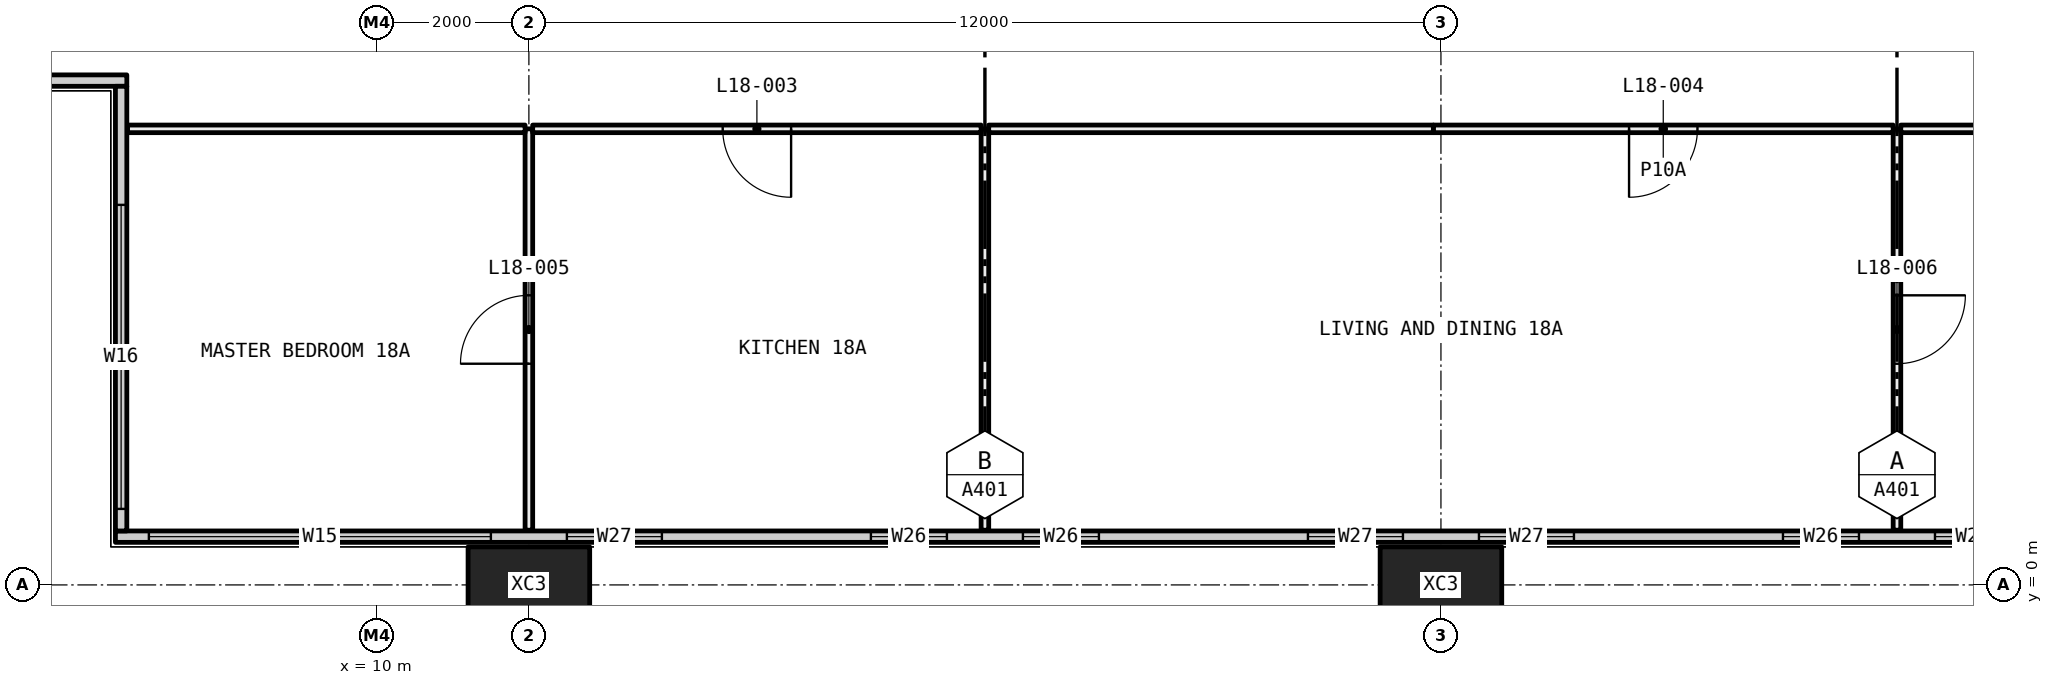
"""IFC4 building model, lengths in metres.
Left out: names, types, materials, properties, quantities, classifications, styles, units other than length and angle.
Written with IfcOpenShell. Run it as: python <this file> out.ifc"""

import sys

from ifc_helpers import new_model, si_unit, direction, frame, frame_2d, origin, origin_2d, place, context, subcontext, project, spatial, rectangle, hollow_rectangle, extrude, element, fill, save


model = new_model("IFC4")
c1 = context("Model", 3, precision=1e-05, world=origin(), true_north=direction((0.0, 1.0)))
c2 = subcontext(c1, "Body", "Model", "MODEL_VIEW")
j1 = project(units=[si_unit("LENGTHUNIT", "METRE"), si_unit("PLANEANGLEUNIT", "RADIAN")], contexts=[c1])
p1 = place(None, origin())
s1 = spatial("IfcSite", under=j1, at=p1, CompositionType="ELEMENT")
p2 = place(p1, origin())
s2 = spatial("IfcBuilding", under=s1, at=p2, CompositionType="ELEMENT")
p3 = place(p2, frame((0.0, 0.0, 74.85)))
s3 = spatial("IfcBuildingStorey", under=s2, at=p3, CompositionType="ELEMENT", Elevation=74.85)
for number, where, z_axis, x_axis in (
    (1, (12.0, 0.0, -0.4), (0.0, 0.0, 1.0), (1.0, 0.0, 0.0)),
    (2, (24.0, 0.0, -0.4), (0.0, 0.0, 1.0), (1.0, 0.0, 0.0)),
):
    element("IfcColumn", number, at=place(p3, frame(where, z_axis=z_axis, x_axis=x_axis)), inside=s3, PredefinedType="COLUMN", context=c2, shape_type="SweptSolid", body=[
        extrude(hollow_rectangle(XDim=1.6, YDim=1.0, WallThickness=0.065, at=origin_2d()), origin(), (0.0, 0.0, 1.0), 3.45),
    ])
p4 = place(p3, frame((6.56, 0.635, 0.0), z_axis=(0.0, 0.0, 1.0), x_axis=(1.0, 0.0, 0.0)))
e3 = element("IfcWall", 3, at=p4, inside=s3, PredefinedType="ELEMENTEDWALL", context=c2, shape_type="SweptSolid", body=[
    extrude(rectangle(XDim=58.88, YDim=0.15, at=frame_2d((29.44, 0.0))), origin(), (0.0, 0.0, 1.0), 3.05),
])
p5 = place(p4, frame((0.44, 0.0, 0.45)))
e4 = element("IfcOpeningElement", 4, at=p5, cuts=e3, PredefinedType="OPENING", context=c2, shape_type="SweptSolid", body=[
    extrude(rectangle(XDim=4.5, YDim=2.55, at=frame_2d((2.25, 1.275))), frame((0.0, 0.085, 0.0), z_axis=(0.0, -1.0, 0.0), x_axis=(1.0, 0.0, 0.0)), (0.0, 0.0, 1.0), 0.17),
])
p6 = place(p4, frame((5.94, 0.0, 0.45)))
e5 = element("IfcOpeningElement", 5, at=p6, cuts=e3, PredefinedType="OPENING", context=c2, shape_type="SweptSolid", body=[
    extrude(rectangle(XDim=1.25, YDim=2.55, at=frame_2d((0.625, 1.275))), frame((0.0, 0.085, 0.0), z_axis=(0.0, -1.0, 0.0), x_axis=(1.0, 0.0, 0.0)), (0.0, 0.0, 1.0), 0.17),
])
p7 = place(p4, frame((9.94, 0.0, 0.45)))
e6 = element("IfcOpeningElement", 6, at=p7, cuts=e3, PredefinedType="OPENING", context=c2, shape_type="SweptSolid", body=[
    extrude(rectangle(XDim=1.0, YDim=2.55, at=frame_2d((0.5, 1.275))), frame((0.0, 0.085, 0.0), z_axis=(0.0, -1.0, 0.0), x_axis=(1.0, 0.0, 0.0)), (0.0, 0.0, 1.0), 0.17),
])
p8 = place(p4, frame((11.94, 0.0, 0.45)))
e7 = element("IfcOpeningElement", 7, at=p8, cuts=e3, PredefinedType="OPENING", context=c2, shape_type="SweptSolid", body=[
    extrude(rectangle(XDim=1.0, YDim=2.55, at=frame_2d((0.5, 1.275))), frame((0.0, 0.085, 0.0), z_axis=(0.0, -1.0, 0.0), x_axis=(1.0, 0.0, 0.0)), (0.0, 0.0, 1.0), 0.17),
])
p9 = place(p4, frame((15.69, 0.0, 0.45)))
e8 = element("IfcOpeningElement", 8, at=p9, cuts=e3, PredefinedType="OPENING", context=c2, shape_type="SweptSolid", body=[
    extrude(rectangle(XDim=1.25, YDim=2.55, at=frame_2d((0.625, 1.275))), frame((0.0, 0.085, 0.0), z_axis=(0.0, -1.0, 0.0), x_axis=(1.0, 0.0, 0.0)), (0.0, 0.0, 1.0), 0.17),
])
p10 = place(p4, frame((17.94, 0.0, 0.45)))
e9 = element("IfcOpeningElement", 9, at=p10, cuts=e3, PredefinedType="OPENING", context=c2, shape_type="SweptSolid", body=[
    extrude(rectangle(XDim=1.25, YDim=2.55, at=frame_2d((0.625, 1.275))), frame((0.0, 0.085, 0.0), z_axis=(0.0, -1.0, 0.0), x_axis=(1.0, 0.0, 0.0)), (0.0, 0.0, 1.0), 0.17),
])
p11 = place(p4, frame((21.94, 0.0, 0.45)))
e10 = element("IfcOpeningElement", 10, at=p11, cuts=e3, PredefinedType="OPENING", context=c2, shape_type="SweptSolid", body=[
    extrude(rectangle(XDim=1.0, YDim=2.55, at=frame_2d((0.5, 1.275))), frame((0.0, 0.085, 0.0), z_axis=(0.0, -1.0, 0.0), x_axis=(1.0, 0.0, 0.0)), (0.0, 0.0, 1.0), 0.17),
])
p12 = place(p4, frame((23.94, 0.0, 0.45)))
e11 = element("IfcOpeningElement", 11, at=p12, cuts=e3, PredefinedType="OPENING", context=c2, shape_type="SweptSolid", body=[
    extrude(rectangle(XDim=1.0, YDim=2.55, at=frame_2d((0.5, 1.275))), frame((0.0, 0.085, 0.0), z_axis=(0.0, -1.0, 0.0), x_axis=(1.0, 0.0, 0.0)), (0.0, 0.0, 1.0), 0.17),
])
p13 = place(p4, frame((27.69, 0.0, 0.45)))
e12 = element("IfcOpeningElement", 12, at=p13, cuts=e3, PredefinedType="OPENING", context=c2, shape_type="SweptSolid", body=[
    extrude(rectangle(XDim=1.25, YDim=2.55, at=frame_2d((0.625, 1.275))), frame((0.0, 0.085, 0.0), z_axis=(0.0, -1.0, 0.0), x_axis=(1.0, 0.0, 0.0)), (0.0, 0.0, 1.0), 0.17),
])
p14 = place(p4, frame((29.94, 0.0, 0.45)))
e13 = element("IfcOpeningElement", 13, at=p14, cuts=e3, PredefinedType="OPENING", context=c2, shape_type="SweptSolid", body=[
    extrude(rectangle(XDim=1.25, YDim=2.55, at=frame_2d((0.625, 1.275))), frame((0.0, 0.085, 0.0), z_axis=(0.0, -1.0, 0.0), x_axis=(1.0, 0.0, 0.0)), (0.0, 0.0, 1.0), 0.17),
])
p15 = place(p4, frame((33.94, 0.0, 0.45)))
e14 = element("IfcOpeningElement", 14, at=p15, cuts=e3, PredefinedType="OPENING", context=c2, shape_type="SweptSolid", body=[
    extrude(rectangle(XDim=1.0, YDim=2.55, at=frame_2d((0.5, 1.275))), frame((0.0, 0.085, 0.0), z_axis=(0.0, -1.0, 0.0), x_axis=(1.0, 0.0, 0.0)), (0.0, 0.0, 1.0), 0.17),
])
p16 = place(p4, frame((35.94, 0.0, 0.45)))
e15 = element("IfcOpeningElement", 15, at=p16, cuts=e3, PredefinedType="OPENING", context=c2, shape_type="SweptSolid", body=[
    extrude(rectangle(XDim=1.0, YDim=2.55, at=frame_2d((0.5, 1.275))), frame((0.0, 0.085, 0.0), z_axis=(0.0, -1.0, 0.0), x_axis=(1.0, 0.0, 0.0)), (0.0, 0.0, 1.0), 0.17),
])
p17 = place(p4, frame((39.69, 0.0, 0.45)))
e16 = element("IfcOpeningElement", 16, at=p17, cuts=e3, PredefinedType="OPENING", context=c2, shape_type="SweptSolid", body=[
    extrude(rectangle(XDim=1.25, YDim=2.55, at=frame_2d((0.625, 1.275))), frame((0.0, 0.085, 0.0), z_axis=(0.0, -1.0, 0.0), x_axis=(1.0, 0.0, 0.0)), (0.0, 0.0, 1.0), 0.17),
])
p18 = place(p4, frame((41.94, 0.0, 0.45)))
e17 = element("IfcOpeningElement", 17, at=p18, cuts=e3, PredefinedType="OPENING", context=c2, shape_type="SweptSolid", body=[
    extrude(rectangle(XDim=1.25, YDim=2.55, at=frame_2d((0.625, 1.275))), frame((0.0, 0.085, 0.0), z_axis=(0.0, -1.0, 0.0), x_axis=(1.0, 0.0, 0.0)), (0.0, 0.0, 1.0), 0.17),
])
p19 = place(p4, frame((45.94, 0.0, 0.45)))
e18 = element("IfcOpeningElement", 18, at=p19, cuts=e3, PredefinedType="OPENING", context=c2, shape_type="SweptSolid", body=[
    extrude(rectangle(XDim=1.0, YDim=2.55, at=frame_2d((0.5, 1.275))), frame((0.0, 0.085, 0.0), z_axis=(0.0, -1.0, 0.0), x_axis=(1.0, 0.0, 0.0)), (0.0, 0.0, 1.0), 0.17),
])
p20 = place(p4, frame((47.94, 0.0, 0.45)))
e19 = element("IfcOpeningElement", 19, at=p20, cuts=e3, PredefinedType="OPENING", context=c2, shape_type="SweptSolid", body=[
    extrude(rectangle(XDim=1.0, YDim=2.55, at=frame_2d((0.5, 1.275))), frame((0.0, 0.085, 0.0), z_axis=(0.0, -1.0, 0.0), x_axis=(1.0, 0.0, 0.0)), (0.0, 0.0, 1.0), 0.17),
])
p21 = place(p4, frame((51.69, 0.0, 0.45)))
e20 = element("IfcOpeningElement", 20, at=p21, cuts=e3, PredefinedType="OPENING", context=c2, shape_type="SweptSolid", body=[
    extrude(rectangle(XDim=1.25, YDim=2.55, at=frame_2d((0.625, 1.275))), frame((0.0, 0.085, 0.0), z_axis=(0.0, -1.0, 0.0), x_axis=(1.0, 0.0, 0.0)), (0.0, 0.0, 1.0), 0.17),
])
p22 = place(p4, frame((53.94, 0.0, 0.45)))
e21 = element("IfcOpeningElement", 21, at=p22, cuts=e3, PredefinedType="OPENING", context=c2, shape_type="SweptSolid", body=[
    extrude(rectangle(XDim=4.5, YDim=2.55, at=frame_2d((2.25, 1.275))), frame((0.0, 0.085, 0.0), z_axis=(0.0, -1.0, 0.0), x_axis=(1.0, 0.0, 0.0)), (0.0, 0.0, 1.0), 0.17),
])
p23 = place(p3, frame((0.56, 6.635, 0.0), z_axis=(0.0, 0.0, 1.0), x_axis=(1.0, 0.0, 0.0)))
e22 = element("IfcWall", 22, at=p23, inside=s3, PredefinedType="ELEMENTEDWALL", context=c2, shape_type="SweptSolid", body=[
    extrude(rectangle(XDim=6.15, YDim=0.15, at=frame_2d((3.075, 0.0))), origin(), (0.0, 0.0, 1.0), 3.05),
])
p24 = place(p23, frame((0.44, 0.0, 0.45)))
e23 = element("IfcOpeningElement", 23, at=p24, cuts=e22, PredefinedType="OPENING", context=c2, shape_type="SweptSolid", body=[
    extrude(rectangle(XDim=4.0, YDim=2.55, at=frame_2d((2.0, 1.275))), frame((0.0, 0.085, 0.0), z_axis=(0.0, -1.0, 0.0), x_axis=(1.0, 0.0, 0.0)), (0.0, 0.0, 1.0), 0.17),
])
p25 = place(p3, frame((6.635, 0.71, 0.0), z_axis=(0.0, 0.0, 1.0), x_axis=(0.0, 1.0, 0.0)))
e24 = element("IfcWall", 24, at=p25, inside=s3, PredefinedType="ELEMENTEDWALL", context=c2, shape_type="SweptSolid", body=[
    extrude(rectangle(XDim=5.85, YDim=0.15, at=frame_2d((2.925, 0.0))), origin(), (0.0, 0.0, 1.0), 3.05),
])
p26 = place(p25, frame((0.29, 0.0, 0.45)))
e25 = element("IfcOpeningElement", 25, at=p26, cuts=e24, PredefinedType="OPENING", context=c2, shape_type="SweptSolid", body=[
    extrude(rectangle(XDim=4.0, YDim=2.55, at=frame_2d((2.0, 1.275))), frame((0.0, 0.085, 0.0), z_axis=(0.0, -1.0, 0.0), x_axis=(1.0, 0.0, 0.0)), (0.0, 0.0, 1.0), 0.17),
])
p27 = place(p3, frame((12.0, 0.72, 0.0), z_axis=(0.0, 0.0, 1.0), x_axis=(0.0, 1.0, 0.0)))
e26 = element("IfcWall", 26, at=p27, inside=s3, PredefinedType="PARTITIONING", context=c2, shape_type="SweptSolid", body=[
    extrude(rectangle(XDim=5.28, YDim=0.1, at=frame_2d((2.64, 0.0))), origin(), (0.0, 0.0, 1.0), 2.45),
])
p28 = place(p27, frame((2.19, 0.0, 0.0)))
e27 = element("IfcOpeningElement", 27, at=p28, cuts=e26, PredefinedType="OPENING", context=c2, shape_type="SweptSolid", body=[
    extrude(rectangle(XDim=0.9, YDim=2.1, at=frame_2d((0.45, 1.05))), frame((0.0, 0.06, 0.0), z_axis=(0.0, -1.0, 0.0), x_axis=(1.0, 0.0, 0.0)), (0.0, 0.0, 1.0), 0.12),
])
p29 = place(p3, frame((11.95, 6.0, 0.0), z_axis=(0.0, 0.0, 1.0), x_axis=(-1.0, 0.0, 0.0)))
e28 = element("IfcWall", 28, at=p29, inside=s3, PredefinedType="PARTITIONING", context=c2, shape_type="SweptSolid", body=[
    extrude(rectangle(XDim=5.23, YDim=0.1, at=frame_2d((2.615, 0.0))), origin(), (0.0, 0.0, 1.0), 2.45),
])
p30 = place(p3, frame((18.0, 0.72, 0.0), z_axis=(0.0, 0.0, 1.0), x_axis=(0.0, 1.0, 0.0)))
e29 = element("IfcWall", 29, at=p30, inside=s3, PredefinedType="PARTITIONING", context=c2, shape_type="SweptSolid", body=[
    extrude(rectangle(XDim=5.28, YDim=0.1, at=frame_2d((2.64, 0.0))), origin(), (0.0, 0.0, 1.0), 3.05),
])
p31 = place(p3, frame((17.95, 6.0, 0.0), z_axis=(0.0, 0.0, 1.0), x_axis=(-1.0, 0.0, 0.0)))
e30 = element("IfcWall", 30, at=p31, inside=s3, PredefinedType="PARTITIONING", context=c2, shape_type="SweptSolid", body=[
    extrude(rectangle(XDim=5.9, YDim=0.1, at=frame_2d((2.95, 0.0))), origin(), (0.0, 0.0, 1.0), 2.45),
])
p32 = place(p31, frame((2.5, 0.0, 0.0)))
e31 = element("IfcOpeningElement", 31, at=p32, cuts=e30, PredefinedType="OPENING", context=c2, shape_type="SweptSolid", body=[
    extrude(rectangle(XDim=0.9, YDim=2.1, at=frame_2d((0.45, 1.05))), frame((0.0, 0.06, 0.0), z_axis=(0.0, -1.0, 0.0), x_axis=(1.0, 0.0, 0.0)), (0.0, 0.0, 1.0), 0.12),
])
p33 = place(p3, frame((30.0, 0.72, 0.0), z_axis=(0.0, 0.0, 1.0), x_axis=(0.0, 1.0, 0.0)))
e32 = element("IfcWall", 32, at=p33, inside=s3, PredefinedType="PARTITIONING", context=c2, shape_type="SweptSolid", body=[
    extrude(rectangle(XDim=5.28, YDim=0.1, at=frame_2d((2.64, 0.0))), origin(), (0.0, 0.0, 1.0), 3.05),
])
p34 = place(p33, frame((2.19, 0.0, 0.0)))
e33 = element("IfcOpeningElement", 33, at=p34, cuts=e32, PredefinedType="OPENING", context=c2, shape_type="SweptSolid", body=[
    extrude(rectangle(XDim=0.9, YDim=2.1, at=frame_2d((0.45, 1.05))), frame((0.0, 0.06, 0.0), z_axis=(0.0, -1.0, 0.0), x_axis=(1.0, 0.0, 0.0)), (0.0, 0.0, 1.0), 0.12),
])
p35 = place(p3, frame((29.95, 6.0, 0.0), z_axis=(0.0, 0.0, 1.0), x_axis=(-1.0, 0.0, 0.0)))
e34 = element("IfcWall", 34, at=p35, inside=s3, PredefinedType="PARTITIONING", context=c2, shape_type="SweptSolid", body=[
    extrude(rectangle(XDim=6.05, YDim=0.1, at=frame_2d((3.025, 0.0))), origin(), (0.0, 0.0, 1.0), 2.45),
])
p36 = place(p35, frame((2.575, 0.0, 0.0)))
e35 = element("IfcOpeningElement", 35, at=p36, cuts=e34, PredefinedType="OPENING", context=c2, shape_type="SweptSolid", body=[
    extrude(rectangle(XDim=0.9, YDim=2.1, at=frame_2d((0.45, 1.05))), frame((0.0, 0.06, 0.0), z_axis=(0.0, -1.0, 0.0), x_axis=(1.0, 0.0, 0.0)), (0.0, 0.0, 1.0), 0.12),
])
p37 = place(p3, frame((23.9, 6.0, 0.0), z_axis=(0.0, 0.0, 1.0), x_axis=(-1.0, 0.0, 0.0)))
e36 = element("IfcWall", 36, at=p37, inside=s3, PredefinedType="PARTITIONING", context=c2, shape_type="SweptSolid", body=[
    extrude(rectangle(XDim=5.85, YDim=0.1, at=frame_2d((2.925, 0.0))), origin(), (0.0, 0.0, 1.0), 3.05),
])
p38 = place(p3, frame((32.925, 6.0, 0.0), z_axis=(0.0, 0.0, 1.0), x_axis=(-1.0, 0.0, 0.0)))
e37 = element("IfcWall", 37, at=p38, inside=s3, PredefinedType="PARTITIONING", context=c2, shape_type="SweptSolid", body=[
    extrude(rectangle(XDim=2.875, YDim=0.1, at=frame_2d((1.438, 0.0))), origin(), (0.0, 0.0, 1.0), 3.05),
])
p39 = place(p5, origin())
e38 = element("IfcWindow", 38, at=p39, inside=s3, PartitioningType="SINGLE_PANEL", PredefinedType="WINDOW", context=c2, shape_type="SweptSolid", body=[
    extrude(rectangle(XDim=4.5, YDim=2.55, at=frame_2d((2.25, 1.275))), frame((0.0, 0.03, 0.0), z_axis=(0.0, -1.0, 0.0), x_axis=(1.0, 0.0, 0.0)), (0.0, 0.0, 1.0), 0.06),
])
fill(e4, e38)
p40 = place(p6, origin())
e39 = element("IfcWindow", 39, at=p40, inside=s3, PartitioningType="SINGLE_PANEL", PredefinedType="WINDOW", context=c2, shape_type="SweptSolid", body=[
    extrude(rectangle(XDim=1.25, YDim=2.55, at=frame_2d((0.625, 1.275))), frame((0.0, 0.03, 0.0), z_axis=(0.0, -1.0, 0.0), x_axis=(1.0, 0.0, 0.0)), (0.0, 0.0, 1.0), 0.06),
])
fill(e5, e39)
p41 = place(p7, origin())
e40 = element("IfcWindow", 40, at=p41, inside=s3, PartitioningType="SINGLE_PANEL", PredefinedType="WINDOW", context=c2, shape_type="SweptSolid", body=[
    extrude(rectangle(XDim=1.0, YDim=2.55, at=frame_2d((0.5, 1.275))), frame((0.0, 0.03, 0.0), z_axis=(0.0, -1.0, 0.0), x_axis=(1.0, 0.0, 0.0)), (0.0, 0.0, 1.0), 0.06),
])
fill(e6, e40)
p42 = place(p8, origin())
e41 = element("IfcWindow", 41, at=p42, inside=s3, PartitioningType="SINGLE_PANEL", PredefinedType="WINDOW", context=c2, shape_type="SweptSolid", body=[
    extrude(rectangle(XDim=1.0, YDim=2.55, at=frame_2d((0.5, 1.275))), frame((0.0, 0.03, 0.0), z_axis=(0.0, -1.0, 0.0), x_axis=(1.0, 0.0, 0.0)), (0.0, 0.0, 1.0), 0.06),
])
fill(e7, e41)
p43 = place(p9, origin())
e42 = element("IfcWindow", 42, at=p43, inside=s3, PartitioningType="SINGLE_PANEL", PredefinedType="WINDOW", context=c2, shape_type="SweptSolid", body=[
    extrude(rectangle(XDim=1.25, YDim=2.55, at=frame_2d((0.625, 1.275))), frame((0.0, 0.03, 0.0), z_axis=(0.0, -1.0, 0.0), x_axis=(1.0, 0.0, 0.0)), (0.0, 0.0, 1.0), 0.06),
])
fill(e8, e42)
p44 = place(p10, origin())
e43 = element("IfcWindow", 43, at=p44, inside=s3, PartitioningType="SINGLE_PANEL", PredefinedType="WINDOW", context=c2, shape_type="SweptSolid", body=[
    extrude(rectangle(XDim=1.25, YDim=2.55, at=frame_2d((0.625, 1.275))), frame((0.0, 0.03, 0.0), z_axis=(0.0, -1.0, 0.0), x_axis=(1.0, 0.0, 0.0)), (0.0, 0.0, 1.0), 0.06),
])
fill(e9, e43)
p45 = place(p11, origin())
e44 = element("IfcWindow", 44, at=p45, inside=s3, PartitioningType="SINGLE_PANEL", PredefinedType="WINDOW", context=c2, shape_type="SweptSolid", body=[
    extrude(rectangle(XDim=1.0, YDim=2.55, at=frame_2d((0.5, 1.275))), frame((0.0, 0.03, 0.0), z_axis=(0.0, -1.0, 0.0), x_axis=(1.0, 0.0, 0.0)), (0.0, 0.0, 1.0), 0.06),
])
fill(e10, e44)
p46 = place(p12, origin())
e45 = element("IfcWindow", 45, at=p46, inside=s3, PartitioningType="SINGLE_PANEL", PredefinedType="WINDOW", context=c2, shape_type="SweptSolid", body=[
    extrude(rectangle(XDim=1.0, YDim=2.55, at=frame_2d((0.5, 1.275))), frame((0.0, 0.03, 0.0), z_axis=(0.0, -1.0, 0.0), x_axis=(1.0, 0.0, 0.0)), (0.0, 0.0, 1.0), 0.06),
])
fill(e11, e45)
p47 = place(p26, origin())
e46 = element("IfcWindow", 46, at=p47, inside=s3, PartitioningType="SINGLE_PANEL", PredefinedType="WINDOW", context=c2, shape_type="SweptSolid", body=[
    extrude(rectangle(XDim=4.0, YDim=2.55, at=frame_2d((2.0, 1.275))), frame((0.0, 0.03, 0.0), z_axis=(0.0, -1.0, 0.0), x_axis=(1.0, 0.0, 0.0)), (0.0, 0.0, 1.0), 0.06),
])
fill(e25, e46)
p48 = place(p32, origin())
e47 = element("IfcDoor", 47, at=p48, inside=s3, OperationType="SINGLE_SWING_RIGHT", PredefinedType="DOOR", context=c2, shape_type="SweptSolid", body=[
    extrude(rectangle(XDim=0.9, YDim=2.1, at=frame_2d((0.45, 1.05))), frame((0.0, 0.025, 0.0), z_axis=(0.0, -1.0, 0.0), x_axis=(1.0, 0.0, 0.0)), (0.0, 0.0, 1.0), 0.05),
])
fill(e31, e47)
p49 = place(p36, origin())
e48 = element("IfcDoor", 48, at=p49, inside=s3, OperationType="SINGLE_SWING_LEFT", PredefinedType="DOOR", context=c2, shape_type="SweptSolid", body=[
    extrude(rectangle(XDim=0.9, YDim=2.1, at=frame_2d((0.45, 1.05))), frame((0.0, 0.025, 0.0), z_axis=(0.0, -1.0, 0.0), x_axis=(1.0, 0.0, 0.0)), (0.0, 0.0, 1.0), 0.05),
])
fill(e35, e48)
p50 = place(p28, origin())
e49 = element("IfcDoor", 49, at=p50, inside=s3, OperationType="SINGLE_SWING_RIGHT", PredefinedType="DOOR", context=c2, shape_type="SweptSolid", body=[
    extrude(rectangle(XDim=0.9, YDim=2.1, at=frame_2d((0.45, 1.05))), frame((0.0, 0.025, 0.0), z_axis=(0.0, -1.0, 0.0), x_axis=(1.0, 0.0, 0.0)), (0.0, 0.0, 1.0), 0.05),
])
fill(e27, e49)
p51 = place(p34, frame((0.9, 0.0, 0.0), x_axis=(-1.0, 0.0, 0.0)))
e50 = element("IfcDoor", 50, at=p51, inside=s3, OperationType="SINGLE_SWING_RIGHT", PredefinedType="DOOR", context=c2, shape_type="SweptSolid", body=[
    extrude(rectangle(XDim=0.9, YDim=2.1, at=frame_2d((0.45, 1.05))), frame((0.0, 0.025, 0.0), z_axis=(0.0, -1.0, 0.0), x_axis=(1.0, 0.0, 0.0)), (0.0, 0.0, 1.0), 0.05),
])
fill(e33, e50)
save(model, sys.argv[1])
